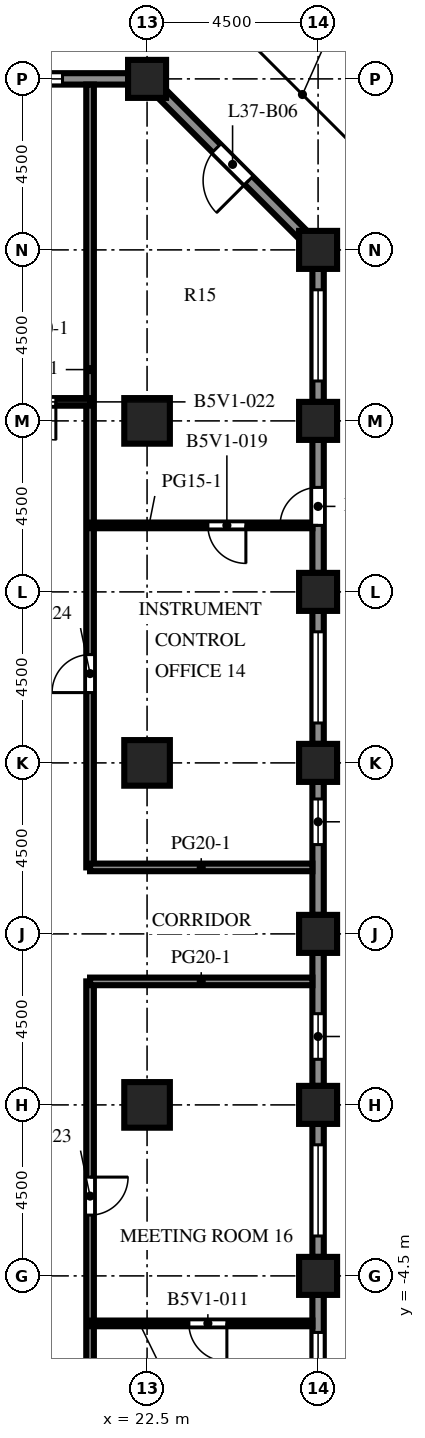
"""IFC4 building model, lengths in metres.
Left out: names, types, materials, properties, quantities, classifications, styles, units other than length and angle.
Written with IfcOpenShell. Run it as: python <this file> out.ifc"""

import sys

from ifc_helpers import new_model, si_unit, direction, frame, frame_2d, origin, origin_2d, place, context, subcontext, project, spatial, rectangle, extrude, element, fill, save


model = new_model("IFC4")
c1 = context("Model", 3, precision=1e-05, world=origin(), true_north=direction((0.0, 1.0)))
c2 = subcontext(c1, "Body", "Model", "MODEL_VIEW")
j1 = project(units=[si_unit("LENGTHUNIT", "METRE"), si_unit("PLANEANGLEUNIT", "RADIAN")], contexts=[c1])
p1 = place(None, origin())
s1 = spatial("IfcSite", under=j1, at=p1, CompositionType="ELEMENT")
p2 = place(p1, origin())
s2 = spatial("IfcBuilding", under=s1, at=p2, CompositionType="ELEMENT")
p3 = place(p2, frame((0.0, 0.0, 165.0)))
s3 = spatial("IfcBuildingStorey", under=s2, at=p3, CompositionType="ELEMENT", Elevation=165.0)
for number, where, z_axis, x_axis in (
    (1, (22.5, 27.0, 0.0), (0.0, 0.0, 1.0), (1.0, 0.0, 0.0)),
    (2, (27.0, -4.5, 0.0), (0.0, 0.0, 1.0), (1.0, 0.0, 0.0)),
    (3, (27.0, 0.0, 0.0), (0.0, 0.0, 1.0), (1.0, 0.0, 0.0)),
    (4, (27.0, 4.5, 0.0), (0.0, 0.0, 1.0), (1.0, 0.0, 0.0)),
    (5, (27.0, 9.0, 0.0), (0.0, 0.0, 1.0), (1.0, 0.0, 0.0)),
    (6, (27.0, 13.5, 0.0), (0.0, 0.0, 1.0), (1.0, 0.0, 0.0)),
    (7, (27.0, 18.0, 0.0), (0.0, 0.0, 1.0), (1.0, 0.0, 0.0)),
    (8, (27.0, 22.5, 0.0), (0.0, 0.0, 1.0), (1.0, 0.0, 0.0)),
):
    element("IfcColumn", number, at=place(p3, frame(where, z_axis=z_axis, x_axis=x_axis)), inside=s3, PredefinedType="COLUMN", context=c2, shape_type="SweptSolid", body=[
        extrude(rectangle(XDim=1.0, YDim=1.0, at=origin_2d()), origin(), (0.0, 0.0, 1.0), 4.1),
    ])
for number, where, z_axis, x_axis in (
    (9, (22.5, 0.0, 0.0), (0.0, 0.0, 1.0), (1.0, 0.0, 0.0)),
    (10, (22.5, 9.0, 0.0), (0.0, 0.0, 1.0), (1.0, 0.0, 0.0)),
    (11, (22.5, 18.0, 0.0), (0.0, 0.0, 1.0), (1.0, 0.0, 0.0)),
):
    element("IfcColumn", number, at=place(p3, frame(where, z_axis=z_axis, x_axis=x_axis)), inside=s3, PredefinedType="COLUMN", context=c2, shape_type="SweptSolid", body=[
        extrude(rectangle(XDim=1.2, YDim=1.2, at=origin_2d()), origin(), (0.0, 0.0, 1.0), 4.1),
    ])
p4 = place(p3, frame((27.0, -5.0, 0.0), z_axis=(0.0, 0.0, 1.0), x_axis=(0.0, -1.0, 0.0)))
e12 = element("IfcWall", 12, at=p4, inside=s3, PredefinedType="SOLIDWALL", context=c2, shape_type="SweptSolid", body=[
    extrude(rectangle(XDim=3.5, YDim=0.3, at=frame_2d((1.75, 0.0))), origin(), (0.0, 0.0, 1.0), 2.85),
])
p5 = place(p4, frame((0.988, 0.0, 0.8)))
e13 = element("IfcOpeningElement", 13, at=p5, cuts=e12, PredefinedType="OPENING", context=c2, shape_type="SweptSolid", body=[
    extrude(rectangle(XDim=2.4, YDim=1.7, at=frame_2d((1.2, 0.85))), frame((0.0, 0.16, 0.0), z_axis=(0.0, -1.0, 0.0), x_axis=(1.0, 0.0, 0.0)), (0.0, 0.0, 1.0), 0.32),
])
p6 = place(p3, frame((27.0, -0.5, 0.0), z_axis=(0.0, 0.0, 1.0), x_axis=(0.0, -1.0, 0.0)))
e14 = element("IfcWall", 14, at=p6, inside=s3, PredefinedType="SOLIDWALL", context=c2, shape_type="SweptSolid", body=[
    extrude(rectangle(XDim=3.5, YDim=0.3, at=frame_2d((1.75, 0.0))), origin(), (0.0, 0.0, 1.0), 2.85),
])
p7 = place(p6, frame((0.55, 0.0, 0.8)))
e15 = element("IfcOpeningElement", 15, at=p7, cuts=e14, PredefinedType="OPENING", context=c2, shape_type="SweptSolid", body=[
    extrude(rectangle(XDim=2.4, YDim=1.7, at=frame_2d((1.2, 0.85))), frame((0.0, 0.16, 0.0), z_axis=(0.0, -1.0, 0.0), x_axis=(1.0, 0.0, 0.0)), (0.0, 0.0, 1.0), 0.32),
])
p8 = place(p3, frame((27.0, 4.0, 0.0), z_axis=(0.0, 0.0, 1.0), x_axis=(0.0, -1.0, 0.0)))
e16 = element("IfcWall", 16, at=p8, inside=s3, PredefinedType="SOLIDWALL", context=c2, shape_type="SweptSolid", body=[
    extrude(rectangle(XDim=3.5, YDim=0.3, at=frame_2d((1.75, 0.0))), origin(), (0.0, 0.0, 1.0), 2.85),
])
p9 = place(p8, frame((1.6, 0.0, 0.8)))
e17 = element("IfcOpeningElement", 17, at=p9, cuts=e16, PredefinedType="OPENING", context=c2, shape_type="SweptSolid", body=[
    extrude(rectangle(XDim=1.2, YDim=1.7, at=frame_2d((0.6, 0.85))), frame((0.0, 0.16, 0.0), z_axis=(0.0, -1.0, 0.0), x_axis=(1.0, 0.0, 0.0)), (0.0, 0.0, 1.0), 0.32),
])
p10 = place(p3, frame((27.0, 8.5, 0.0), z_axis=(0.0, 0.0, 1.0), x_axis=(0.0, -1.0, 0.0)))
e18 = element("IfcWall", 18, at=p10, inside=s3, PredefinedType="SOLIDWALL", context=c2, shape_type="SweptSolid", body=[
    extrude(rectangle(XDim=3.5, YDim=0.3, at=frame_2d((1.75, 0.0))), origin(), (0.0, 0.0, 1.0), 2.85),
])
p11 = place(p10, frame((0.45, 0.0, 0.8)))
e19 = element("IfcOpeningElement", 19, at=p11, cuts=e18, PredefinedType="OPENING", context=c2, shape_type="SweptSolid", body=[
    extrude(rectangle(XDim=1.2, YDim=1.7, at=frame_2d((0.6, 0.85))), frame((0.0, 0.16, 0.0), z_axis=(0.0, -1.0, 0.0), x_axis=(1.0, 0.0, 0.0)), (0.0, 0.0, 1.0), 0.32),
])
p12 = place(p3, frame((27.0, 13.0, 0.0), z_axis=(0.0, 0.0, 1.0), x_axis=(0.0, -1.0, 0.0)))
e20 = element("IfcWall", 20, at=p12, inside=s3, PredefinedType="SOLIDWALL", context=c2, shape_type="SweptSolid", body=[
    extrude(rectangle(XDim=3.5, YDim=0.3, at=frame_2d((1.75, 0.0))), origin(), (0.0, 0.0, 1.0), 2.85),
])
p13 = place(p12, frame((0.55, 0.0, 0.8)))
e21 = element("IfcOpeningElement", 21, at=p13, cuts=e20, PredefinedType="OPENING", context=c2, shape_type="SweptSolid", body=[
    extrude(rectangle(XDim=2.4, YDim=1.7, at=frame_2d((1.2, 0.85))), frame((0.0, 0.16, 0.0), z_axis=(0.0, -1.0, 0.0), x_axis=(1.0, 0.0, 0.0)), (0.0, 0.0, 1.0), 0.32),
])
p14 = place(p3, frame((27.0, 17.5, 0.0), z_axis=(0.0, 0.0, 1.0), x_axis=(0.0, -1.0, 0.0)))
e22 = element("IfcWall", 22, at=p14, inside=s3, PredefinedType="SOLIDWALL", context=c2, shape_type="SweptSolid", body=[
    extrude(rectangle(XDim=3.5, YDim=0.3, at=frame_2d((1.75, 0.0))), origin(), (0.0, 0.0, 1.0), 2.85),
])
p15 = place(p14, frame((1.25, 0.0, 0.0)))
e23 = element("IfcOpeningElement", 23, at=p15, cuts=e22, PredefinedType="OPENING", context=c2, shape_type="SweptSolid", body=[
    extrude(rectangle(XDim=1.0, YDim=2.2, at=frame_2d((0.5, 1.1))), frame((0.0, 0.16, 0.0), z_axis=(0.0, -1.0, 0.0), x_axis=(1.0, 0.0, 0.0)), (0.0, 0.0, 1.0), 0.32),
])
p16 = place(p3, frame((27.0, 22.0, 0.0), z_axis=(0.0, 0.0, 1.0), x_axis=(0.0, -1.0, 0.0)))
e24 = element("IfcWall", 24, at=p16, inside=s3, PredefinedType="SOLIDWALL", context=c2, shape_type="SweptSolid", body=[
    extrude(rectangle(XDim=3.5, YDim=0.3, at=frame_2d((1.75, 0.0))), origin(), (0.0, 0.0, 1.0), 2.85),
])
p17 = place(p16, frame((0.55, 0.0, 0.8)))
e25 = element("IfcOpeningElement", 25, at=p17, cuts=e24, PredefinedType="OPENING", context=c2, shape_type="SweptSolid", body=[
    extrude(rectangle(XDim=2.4, YDim=1.7, at=frame_2d((1.2, 0.85))), frame((0.0, 0.16, 0.0), z_axis=(0.0, -1.0, 0.0), x_axis=(1.0, 0.0, 0.0)), (0.0, 0.0, 1.0), 0.32),
])
p18 = place(p3, frame((22.894, 26.606, 0.0), z_axis=(0.0, 0.0, 1.0), x_axis=(0.707106781187, -0.707106781187, 0.0)))
e26 = element("IfcWall", 26, at=p18, inside=s3, PredefinedType="SOLIDWALL", context=c2, shape_type="SweptSolid", body=[
    extrude(rectangle(XDim=5.25, YDim=0.3, at=frame_2d((2.625, 0.0))), origin(), (0.0, 0.0, 1.0), 2.85),
])
p19 = place(p18, frame((2.025, 0.0, 0.0)))
e27 = element("IfcOpeningElement", 27, at=p19, cuts=e26, PredefinedType="OPENING", context=c2, shape_type="SweptSolid", body=[
    extrude(rectangle(XDim=1.2, YDim=2.2, at=frame_2d((0.6, 1.1))), frame((0.0, 0.16, 0.0), z_axis=(0.0, -1.0, 0.0), x_axis=(1.0, 0.0, 0.0)), (0.0, 0.0, 1.0), 0.32),
])
p20 = place(p3, frame((18.5, 27.0, 0.0), z_axis=(0.0, 0.0, 1.0), x_axis=(1.0, 0.0, 0.0)))
e28 = element("IfcWall", 28, at=p20, inside=s3, PredefinedType="SOLIDWALL", context=c2, shape_type="SweptSolid", body=[
    extrude(rectangle(XDim=3.5, YDim=0.3, at=frame_2d((1.75, 0.0))), origin(), (0.0, 0.0, 1.0), 2.85),
])
p21 = place(p20, frame((0.575, 0.0, 0.8)))
e29 = element("IfcOpeningElement", 29, at=p21, cuts=e28, PredefinedType="OPENING", context=c2, shape_type="SweptSolid", body=[
    extrude(rectangle(XDim=1.2, YDim=1.7, at=frame_2d((0.6, 0.85))), frame((0.0, 0.16, 0.0), z_axis=(0.0, -1.0, 0.0), x_axis=(1.0, 0.0, 0.0)), (0.0, 0.0, 1.0), 0.32),
])
p22 = place(p3, frame((21.0, 3.25, 0.0), z_axis=(0.0, 0.0, 1.0), x_axis=(0.0, -1.0, 0.0)))
e30 = element("IfcWall", 30, at=p22, inside=s3, PredefinedType="PARTITIONING", context=c2, shape_type="SweptSolid", body=[
    extrude(rectangle(XDim=30.1, YDim=0.2, at=frame_2d((15.05, 0.0))), origin(), (0.0, 0.0, 1.0), 3.65),
])
p23 = place(p22, frame((5.15, 0.0, 0.0)))
e31 = element("IfcOpeningElement", 31, at=p23, cuts=e30, PredefinedType="OPENING", context=c2, shape_type="SweptSolid", body=[
    extrude(rectangle(XDim=1.0, YDim=2.1, at=frame_2d((0.5, 1.05))), frame((0.0, 0.11, 0.0), z_axis=(0.0, -1.0, 0.0), x_axis=(1.0, 0.0, 0.0)), (0.0, 0.0, 1.0), 0.22),
])
p24 = place(p3, frame((21.0, 26.85, 0.0), z_axis=(0.0, 0.0, 1.0), x_axis=(0.0, -1.0, 0.0)))
e32 = element("IfcWall", 32, at=p24, inside=s3, PredefinedType="PARTITIONING", context=c2, shape_type="SweptSolid", body=[
    extrude(rectangle(XDim=20.6, YDim=0.2, at=frame_2d((10.3, 0.0))), origin(), (0.0, 0.0, 1.0), 3.65),
])
p25 = place(p24, frame((15.0, 0.0, 0.0)))
e33 = element("IfcOpeningElement", 33, at=p25, cuts=e32, PredefinedType="OPENING", context=c2, shape_type="SweptSolid", body=[
    extrude(rectangle(XDim=1.0, YDim=2.1, at=frame_2d((0.5, 1.05))), frame((0.0, 0.11, 0.0), z_axis=(0.0, -1.0, 0.0), x_axis=(1.0, 0.0, 0.0)), (0.0, 0.0, 1.0), 0.22),
])
p26 = place(p3, frame((26.85, -5.75, 0.0), z_axis=(0.0, 0.0, 1.0), x_axis=(-1.0, 0.0, 0.0)))
e34 = element("IfcWall", 34, at=p26, inside=s3, PredefinedType="PARTITIONING", context=c2, shape_type="SweptSolid", body=[
    extrude(rectangle(XDim=5.85, YDim=0.15, at=frame_2d((2.925, 0.0))), origin(), (0.0, 0.0, 1.0), 3.65),
])
p27 = place(p26, frame((2.25, 0.0, 0.0)))
e35 = element("IfcOpeningElement", 35, at=p27, cuts=e34, PredefinedType="OPENING", context=c2, shape_type="SweptSolid", body=[
    extrude(rectangle(XDim=1.0, YDim=2.1, at=frame_2d((0.5, 1.05))), frame((0.0, 0.085, 0.0), z_axis=(0.0, -1.0, 0.0), x_axis=(1.0, 0.0, 0.0)), (0.0, 0.0, 1.0), 0.17),
])
for number, where, z_axis, x_axis in (
    (36, (21.0, 3.25, 0.0), (0.0, 0.0, 1.0), (1.0, 0.0, 0.0)),
    (37, (21.0, 6.25, 0.0), (0.0, 0.0, 1.0), (1.0, 0.0, 0.0)),
):
    element("IfcWall", number, at=place(p3, frame(where, z_axis=z_axis, x_axis=x_axis)), inside=s3, PredefinedType="PARTITIONING", context=c2, shape_type="SweptSolid", body=[
        extrude(rectangle(XDim=5.85, YDim=0.2, at=frame_2d((2.925, 0.0))), origin(), (0.0, 0.0, 1.0), 3.65),
    ])
p28 = place(p3, frame((21.0, 15.25, 0.0), z_axis=(0.0, 0.0, 1.0), x_axis=(1.0, 0.0, 0.0)))
e38 = element("IfcWall", 38, at=p28, inside=s3, PredefinedType="PARTITIONING", context=c2, shape_type="SweptSolid", body=[
    extrude(rectangle(XDim=5.85, YDim=0.15, at=frame_2d((2.925, 0.0))), origin(), (0.0, 0.0, 1.0), 3.65),
])
p29 = place(p28, frame((3.1, 0.0, 0.0)))
e39 = element("IfcOpeningElement", 39, at=p29, cuts=e38, PredefinedType="OPENING", context=c2, shape_type="SweptSolid", body=[
    extrude(rectangle(XDim=1.0, YDim=2.1, at=frame_2d((0.5, 1.05))), frame((0.0, 0.085, 0.0), z_axis=(0.0, -1.0, 0.0), x_axis=(1.0, 0.0, 0.0)), (0.0, 0.0, 1.0), 0.17),
])
p30 = place(p3, frame((18.0, 18.5, 0.0), z_axis=(0.0, 0.0, 1.0), x_axis=(1.0, 0.0, 0.0)))
e40 = element("IfcWall", 40, at=p30, inside=s3, PredefinedType="PARTITIONING", context=c2, shape_type="SweptSolid", body=[
    extrude(rectangle(XDim=3.0, YDim=0.2, at=frame_2d((1.5, 0.0))), origin(), (0.0, 0.0, 1.0), 3.65),
])
p31 = place(p30, frame((1.1, 0.0, 0.0)))
e41 = element("IfcOpeningElement", 41, at=p31, cuts=e40, PredefinedType="OPENING", context=c2, shape_type="SweptSolid", body=[
    extrude(rectangle(XDim=1.0, YDim=2.1, at=frame_2d((0.5, 1.05))), frame((0.0, 0.11, 0.0), z_axis=(0.0, -1.0, 0.0), x_axis=(1.0, 0.0, 0.0)), (0.0, 0.0, 1.0), 0.22),
])
p32 = place(p5, origin())
e42 = element("IfcWindow", 42, at=p32, inside=s3, PartitioningType="SINGLE_PANEL", PredefinedType="WINDOW", context=c2, shape_type="SweptSolid", body=[
    extrude(rectangle(XDim=2.4, YDim=1.7, at=frame_2d((1.2, 0.85))), frame((0.0, 0.03, 0.0), z_axis=(0.0, -1.0, 0.0), x_axis=(1.0, 0.0, 0.0)), (0.0, 0.0, 1.0), 0.06),
])
fill(e13, e42)
p33 = place(p7, origin())
e43 = element("IfcWindow", 43, at=p33, inside=s3, PartitioningType="SINGLE_PANEL", PredefinedType="WINDOW", context=c2, shape_type="SweptSolid", body=[
    extrude(rectangle(XDim=2.4, YDim=1.7, at=frame_2d((1.2, 0.85))), frame((0.0, 0.03, 0.0), z_axis=(0.0, -1.0, 0.0), x_axis=(1.0, 0.0, 0.0)), (0.0, 0.0, 1.0), 0.06),
])
fill(e15, e43)
p34 = place(p9, origin())
e44 = element("IfcWindow", 44, at=p34, inside=s3, PartitioningType="SINGLE_PANEL", PredefinedType="WINDOW", context=c2, shape_type="SweptSolid", body=[
    extrude(rectangle(XDim=1.2, YDim=1.7, at=frame_2d((0.6, 0.85))), frame((0.0, 0.03, 0.0), z_axis=(0.0, -1.0, 0.0), x_axis=(1.0, 0.0, 0.0)), (0.0, 0.0, 1.0), 0.06),
])
fill(e17, e44)
p35 = place(p11, origin())
e45 = element("IfcWindow", 45, at=p35, inside=s3, PartitioningType="SINGLE_PANEL", PredefinedType="WINDOW", context=c2, shape_type="SweptSolid", body=[
    extrude(rectangle(XDim=1.2, YDim=1.7, at=frame_2d((0.6, 0.85))), frame((0.0, 0.03, 0.0), z_axis=(0.0, -1.0, 0.0), x_axis=(1.0, 0.0, 0.0)), (0.0, 0.0, 1.0), 0.06),
])
fill(e19, e45)
p36 = place(p13, origin())
e46 = element("IfcWindow", 46, at=p36, inside=s3, PartitioningType="SINGLE_PANEL", PredefinedType="WINDOW", context=c2, shape_type="SweptSolid", body=[
    extrude(rectangle(XDim=2.4, YDim=1.7, at=frame_2d((1.2, 0.85))), frame((0.0, 0.03, 0.0), z_axis=(0.0, -1.0, 0.0), x_axis=(1.0, 0.0, 0.0)), (0.0, 0.0, 1.0), 0.06),
])
fill(e21, e46)
p37 = place(p15, origin())
e47 = element("IfcDoor", 47, at=p37, inside=s3, OperationType="SINGLE_SWING_RIGHT", PredefinedType="DOOR", context=c2, shape_type="SweptSolid", body=[
    extrude(rectangle(XDim=1.0, YDim=2.2, at=frame_2d((0.5, 1.1))), frame((0.0, 0.025, 0.0), z_axis=(0.0, -1.0, 0.0), x_axis=(1.0, 0.0, 0.0)), (0.0, 0.0, 1.0), 0.05),
])
fill(e23, e47)
p38 = place(p17, origin())
e48 = element("IfcWindow", 48, at=p38, inside=s3, PartitioningType="SINGLE_PANEL", PredefinedType="WINDOW", context=c2, shape_type="SweptSolid", body=[
    extrude(rectangle(XDim=2.4, YDim=1.7, at=frame_2d((1.2, 0.85))), frame((0.0, 0.03, 0.0), z_axis=(0.0, -1.0, 0.0), x_axis=(1.0, 0.0, 0.0)), (0.0, 0.0, 1.0), 0.06),
])
fill(e25, e48)
p39 = place(p19, origin())
e49 = element("IfcDoor", 49, at=p39, inside=s3, OperationType="SINGLE_SWING_RIGHT", PredefinedType="DOOR", context=c2, shape_type="SweptSolid", body=[
    extrude(rectangle(XDim=1.2, YDim=2.2, at=frame_2d((0.6, 1.1))), frame((0.0, 0.025, 0.0), z_axis=(0.0, -1.0, 0.0), x_axis=(1.0, 0.0, 0.0)), (0.0, 0.0, 1.0), 0.05),
])
fill(e27, e49)
p40 = place(p21, origin())
e50 = element("IfcWindow", 50, at=p40, inside=s3, PartitioningType="SINGLE_PANEL", PredefinedType="WINDOW", context=c2, shape_type="SweptSolid", body=[
    extrude(rectangle(XDim=1.2, YDim=1.7, at=frame_2d((0.6, 0.85))), frame((0.0, 0.03, 0.0), z_axis=(0.0, -1.0, 0.0), x_axis=(1.0, 0.0, 0.0)), (0.0, 0.0, 1.0), 0.06),
])
fill(e29, e50)
p41 = place(p27, origin())
e51 = element("IfcDoor", 51, at=p41, inside=s3, OperationType="SINGLE_SWING_LEFT", PredefinedType="DOOR", context=c2, shape_type="SweptSolid", body=[
    extrude(rectangle(XDim=1.0, YDim=2.1, at=frame_2d((0.5, 1.05))), frame((0.0, 0.025, 0.0), z_axis=(0.0, -1.0, 0.0), x_axis=(1.0, 0.0, 0.0)), (0.0, 0.0, 1.0), 0.05),
])
fill(e35, e51)
p42 = place(p29, origin())
e52 = element("IfcDoor", 52, at=p42, inside=s3, OperationType="SINGLE_SWING_RIGHT", PredefinedType="DOOR", context=c2, shape_type="SweptSolid", body=[
    extrude(rectangle(XDim=1.0, YDim=2.1, at=frame_2d((0.5, 1.05))), frame((0.0, 0.025, 0.0), z_axis=(0.0, -1.0, 0.0), x_axis=(1.0, 0.0, 0.0)), (0.0, 0.0, 1.0), 0.05),
])
fill(e39, e52)
p43 = place(p31, origin())
e53 = element("IfcDoor", 53, at=p43, inside=s3, OperationType="SINGLE_SWING_RIGHT", PredefinedType="DOOR", context=c2, shape_type="SweptSolid", body=[
    extrude(rectangle(XDim=1.0, YDim=2.1, at=frame_2d((0.5, 1.05))), frame((0.0, 0.025, 0.0), z_axis=(0.0, -1.0, 0.0), x_axis=(1.0, 0.0, 0.0)), (0.0, 0.0, 1.0), 0.05),
])
fill(e41, e53)
p44 = place(p23, origin())
e54 = element("IfcDoor", 54, at=p44, inside=s3, OperationType="SINGLE_SWING_LEFT", PredefinedType="DOOR", context=c2, shape_type="SweptSolid", body=[
    extrude(rectangle(XDim=1.0, YDim=2.1, at=frame_2d((0.5, 1.05))), frame((0.0, 0.025, 0.0), z_axis=(0.0, -1.0, 0.0), x_axis=(1.0, 0.0, 0.0)), (0.0, 0.0, 1.0), 0.05),
])
fill(e31, e54)
p45 = place(p25, origin())
e55 = element("IfcDoor", 55, at=p45, inside=s3, OperationType="SINGLE_SWING_RIGHT", PredefinedType="DOOR", context=c2, shape_type="SweptSolid", body=[
    extrude(rectangle(XDim=1.0, YDim=2.1, at=frame_2d((0.5, 1.05))), frame((0.0, 0.025, 0.0), z_axis=(0.0, -1.0, 0.0), x_axis=(1.0, 0.0, 0.0)), (0.0, 0.0, 1.0), 0.05),
])
fill(e33, e55)
save(model, sys.argv[1])
